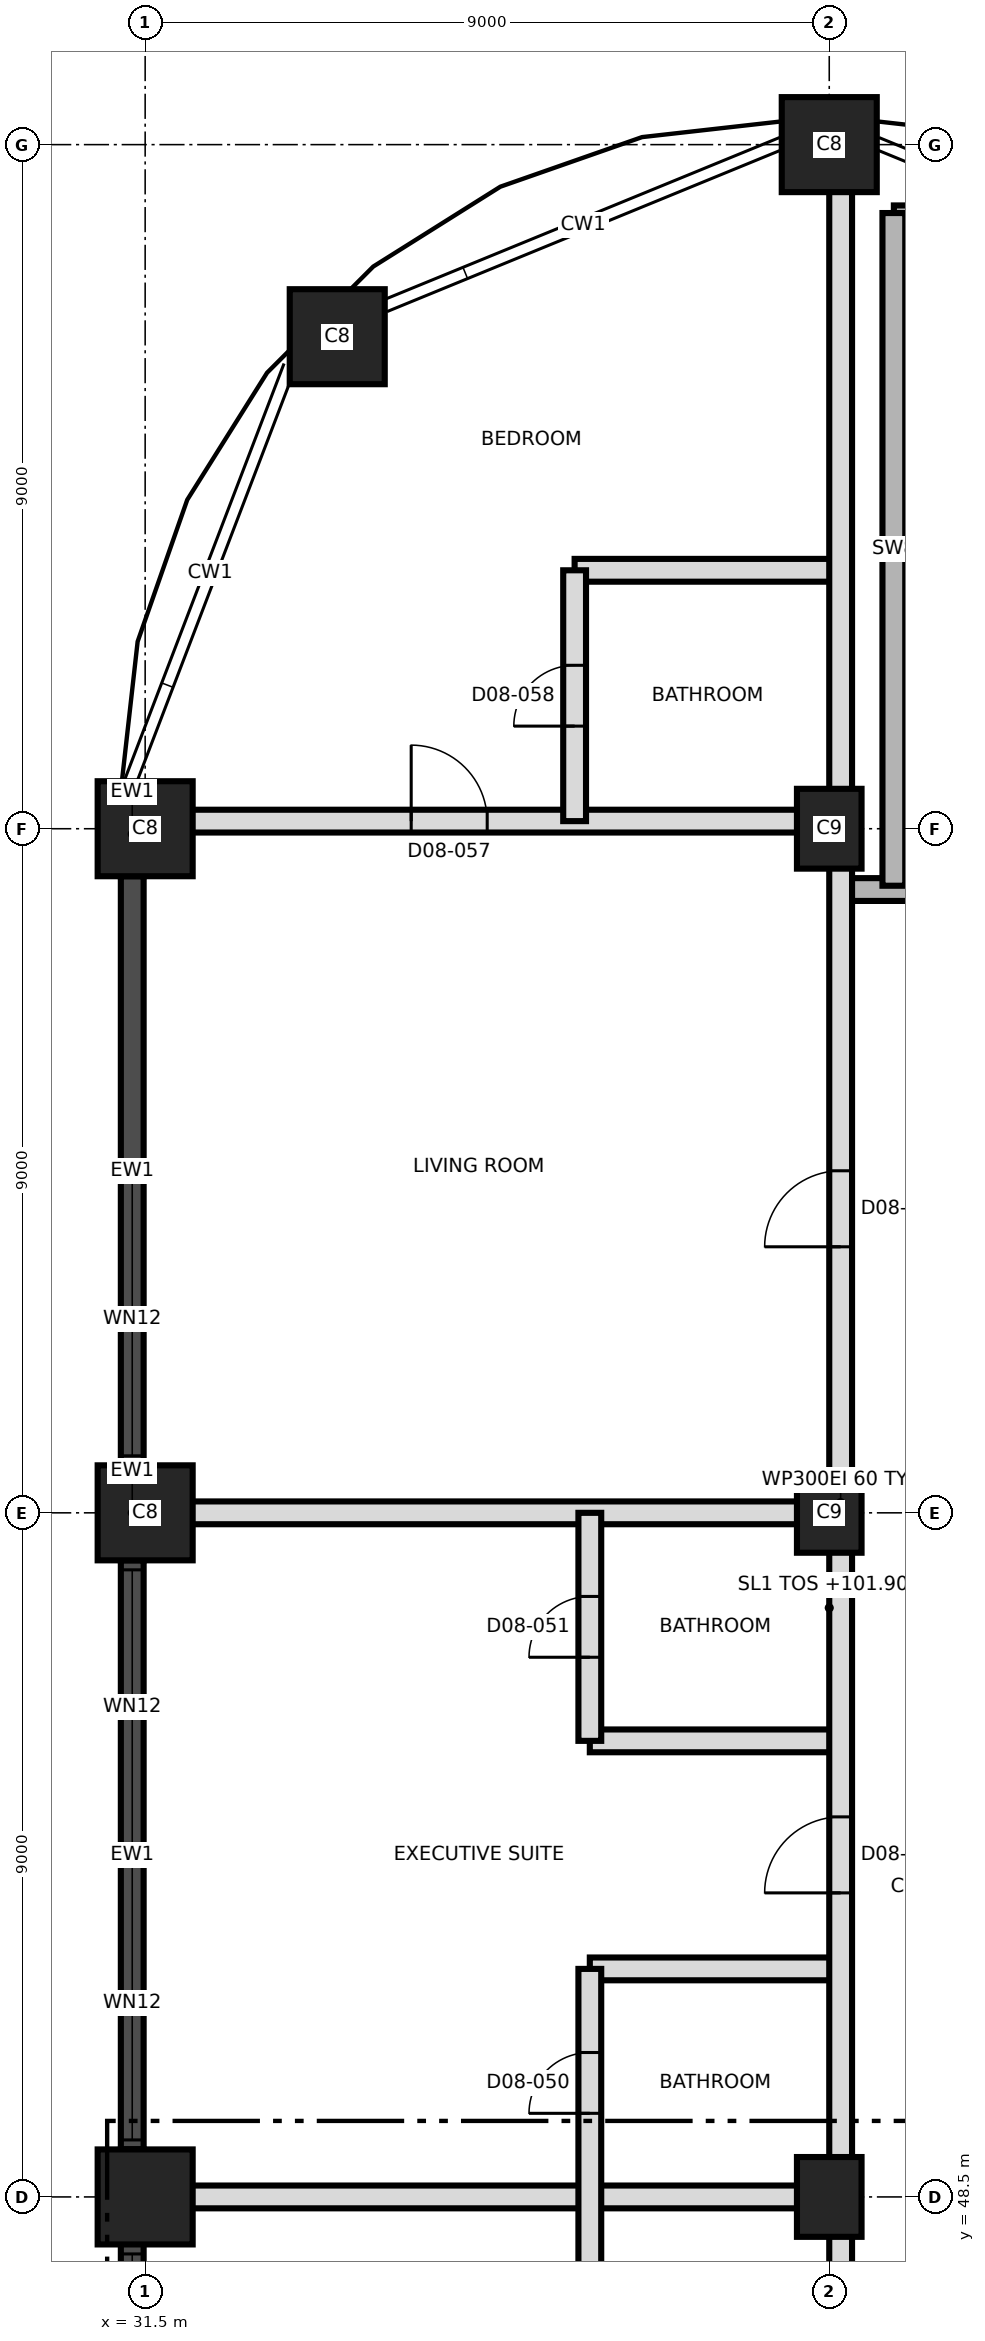
"""IFC4 building model, lengths in metres.
Left out: names, types, materials, properties, quantities, classifications, styles, units other than length and angle.
Written with IfcOpenShell. Run it as: python <this file> out.ifc"""

import sys

from ifc_helpers import new_model, si_unit, direction, frame, frame_2d, origin, origin_2d, place, context, subcontext, project, spatial, rectangle, extrude, element, fill, save


model = new_model("IFC4")
c1 = context("Model", 3, precision=1e-05, world=origin(), true_north=direction((0.0, 1.0)))
c2 = subcontext(c1, "Body", "Model", "MODEL_VIEW")
j1 = project(units=[si_unit("LENGTHUNIT", "METRE"), si_unit("PLANEANGLEUNIT", "RADIAN")], contexts=[c1])
p1 = place(None, origin())
s1 = spatial("IfcSite", under=j1, at=p1, CompositionType="ELEMENT")
p2 = place(p1, origin())
s2 = spatial("IfcBuilding", under=s1, at=p2, CompositionType="ELEMENT")
p3 = place(p2, frame((0.0, 0.0, 101.9)))
s3 = spatial("IfcBuildingStorey", under=s2, at=p3, CompositionType="ELEMENT", Elevation=101.9)
p4 = place(p3, frame((31.5, 48.5, 0.0), z_axis=(0.0, 0.0, 1.0), x_axis=(1.0, 0.0, 0.0)))
e1 = element("IfcColumn", 1, at=p4, inside=s3, PredefinedType="COLUMN", context=c2, shape_type="SweptSolid", body=[
    extrude(rectangle(XDim=1.25, YDim=1.25, at=origin_2d()), origin(), (0.0, 0.0, 1.0), 3.7),
])
p5 = place(p3, frame((40.5, 48.5, 0.0), z_axis=(0.0, 0.0, 1.0), x_axis=(0.0, 1.0, 0.0)))
e2 = element("IfcColumn", 2, at=p5, inside=s3, PredefinedType="COLUMN", context=c2, shape_type="SweptSolid", body=[
    extrude(rectangle(XDim=1.05, YDim=0.85, at=origin_2d()), origin(), (0.0, 0.0, 1.0), 3.7),
])
p6 = place(p3, frame((31.5, 57.5, 0.0), z_axis=(0.0, 0.0, 1.0), x_axis=(1.0, 0.0, 0.0)))
e3 = element("IfcColumn", 3, at=p6, inside=s3, PredefinedType="COLUMN", context=c2, shape_type="SweptSolid", body=[
    extrude(rectangle(XDim=1.25, YDim=1.25, at=origin_2d()), origin(), (0.0, 0.0, 1.0), 3.7),
])
p7 = place(p3, frame((40.5, 57.5, 0.0), z_axis=(0.0, 0.0, 1.0), x_axis=(0.0, 1.0, 0.0)))
e4 = element("IfcColumn", 4, at=p7, inside=s3, PredefinedType="COLUMN", context=c2, shape_type="SweptSolid", body=[
    extrude(rectangle(XDim=1.05, YDim=0.85, at=origin_2d()), origin(), (0.0, 0.0, 1.0), 3.7),
])
p8 = place(p3, frame((31.5, 66.5, 0.0), z_axis=(0.0, 0.0, 1.0), x_axis=(1.0, 0.0, 0.0)))
e5 = element("IfcColumn", 5, at=p8, inside=s3, PredefinedType="COLUMN", context=c2, shape_type="SweptSolid", body=[
    extrude(rectangle(XDim=1.25, YDim=1.25, at=origin_2d()), origin(), (0.0, 0.0, 1.0), 3.7),
])
p9 = place(p3, frame((40.5, 66.5, 0.0), z_axis=(0.0, 0.0, 1.0), x_axis=(0.0, 1.0, 0.0)))
e6 = element("IfcColumn", 6, at=p9, inside=s3, PredefinedType="COLUMN", context=c2, shape_type="SweptSolid", body=[
    extrude(rectangle(XDim=1.05, YDim=0.85, at=origin_2d()), origin(), (0.0, 0.0, 1.0), 3.7),
])
for number, where, z_axis, x_axis in (
    (7, (34.027, 72.973, 0.0), (0.0, 0.0, 1.0), (1.0, 0.0, 0.0)),
    (8, (40.5, 75.5, 0.0), (0.0, 0.0, 1.0), (1.0, 0.0, 0.0)),
):
    element("IfcColumn", number, at=place(p3, frame(where, z_axis=z_axis, x_axis=x_axis)), inside=s3, PredefinedType="COLUMN", context=c2, shape_type="SweptSolid", body=[
        extrude(rectangle(XDim=1.25, YDim=1.25, at=origin_2d()), origin(), (0.0, 0.0, 1.0), 3.7),
    ])
p10 = place(p3, frame((31.33, 66.986, 0.0), z_axis=(0.0, 0.0, 1.0), x_axis=(0.0, -1.0, 0.0)))
e9 = element("IfcWall", 9, at=p10, inside=s3, PredefinedType="SOLIDWALL", context=c2, shape_type="SweptSolid", body=[
    extrude(rectangle(XDim=1.111, YDim=0.3, at=frame_2d((0.556, 0.0))), origin(), (0.0, 0.0, 1.0), 3.4),
])
p11 = place(p3, frame((31.33, 65.875, 0.0), z_axis=(0.0, 0.0, 1.0), x_axis=(0.0, -1.0, 0.0)))
e10 = element("IfcWall", 10, at=p11, inside=s3, PredefinedType="SOLIDWALL", context=c2, shape_type="SweptSolid", body=[
    extrude(rectangle(XDim=7.75, YDim=0.3, at=frame_2d((3.875, 0.0))), origin(), (0.0, 0.0, 1.0), 2.75),
])
p12 = place(p11, frame((4.025, 0.0, 0.9)))
e11 = element("IfcOpeningElement", 11, at=p12, cuts=e10, PredefinedType="OPENING", context=c2, shape_type="SweptSolid", body=[
    extrude(rectangle(XDim=3.6, YDim=1.5, at=frame_2d((1.8, 0.75))), frame((0.0, 0.16, 0.0), z_axis=(0.0, -1.0, 0.0), x_axis=(1.0, 0.0, 0.0)), (0.0, 0.0, 1.0), 0.32),
])
p13 = place(p3, frame((31.33, 58.125, 0.0), z_axis=(0.0, 0.0, 1.0), x_axis=(0.0, -1.0, 0.0)))
e12 = element("IfcWall", 12, at=p13, inside=s3, PredefinedType="SOLIDWALL", context=c2, shape_type="SweptSolid", body=[
    extrude(rectangle(XDim=1.25, YDim=0.3, at=frame_2d((0.625, 0.0))), origin(), (0.0, 0.0, 1.0), 3.4),
])
p14 = place(p3, frame((31.33, 56.875, 0.0), z_axis=(0.0, 0.0, 1.0), x_axis=(0.0, -1.0, 0.0)))
e13 = element("IfcWall", 13, at=p14, inside=s3, PredefinedType="SOLIDWALL", context=c2, shape_type="SweptSolid", body=[
    extrude(rectangle(XDim=7.75, YDim=0.3, at=frame_2d((3.875, 0.0))), origin(), (0.0, 0.0, 1.0), 2.75),
])
p15 = place(p14, frame((0.125, 0.0, 0.9)))
e14 = element("IfcOpeningElement", 14, at=p15, cuts=e13, PredefinedType="OPENING", context=c2, shape_type="SweptSolid", body=[
    extrude(rectangle(XDim=3.6, YDim=1.5, at=frame_2d((1.8, 0.75))), frame((0.0, 0.16, 0.0), z_axis=(0.0, -1.0, 0.0), x_axis=(1.0, 0.0, 0.0)), (0.0, 0.0, 1.0), 0.32),
])
p16 = place(p14, frame((4.025, 0.0, 0.9)))
e15 = element("IfcOpeningElement", 15, at=p16, cuts=e13, PredefinedType="OPENING", context=c2, shape_type="SweptSolid", body=[
    extrude(rectangle(XDim=3.6, YDim=1.5, at=frame_2d((1.8, 0.75))), frame((0.0, 0.16, 0.0), z_axis=(0.0, -1.0, 0.0), x_axis=(1.0, 0.0, 0.0)), (0.0, 0.0, 1.0), 0.32),
])
p17 = place(p3, frame((31.33, 49.125, 0.0), z_axis=(0.0, 0.0, 1.0), x_axis=(0.0, -1.0, 0.0)))
e16 = element("IfcWall", 16, at=p17, inside=s3, PredefinedType="SOLIDWALL", context=c2, shape_type="SweptSolid", body=[
    extrude(rectangle(XDim=8.905, YDim=0.3, at=frame_2d((4.452, 0.0))), origin(), (0.0, 0.0, 1.0), 3.4),
])
p18 = place(p17, frame((1.375, 0.0, 0.9)))
e17 = element("IfcOpeningElement", 17, at=p18, cuts=e16, PredefinedType="OPENING", context=c2, shape_type="SweptSolid", body=[
    extrude(rectangle(XDim=3.6, YDim=1.5, at=frame_2d((1.8, 0.75))), frame((0.0, 0.16, 0.0), z_axis=(0.0, -1.0, 0.0), x_axis=(1.0, 0.0, 0.0)), (0.0, 0.0, 1.0), 0.32),
])
p19 = place(p17, frame((6.115, 0.0, 0.3)))
e18 = element("IfcOpeningElement", 18, at=p19, cuts=e16, PredefinedType="OPENING", context=c2, shape_type="SweptSolid", body=[
    extrude(rectangle(XDim=1.8, YDim=2.4, at=frame_2d((0.9, 1.2))), frame((0.0, 0.16, 0.0), z_axis=(0.0, -1.0, 0.0), x_axis=(1.0, 0.0, 0.0)), (0.0, 0.0, 1.0), 0.32),
])
p20 = place(p3, frame((31.53, 48.5, 0.0), z_axis=(0.0, 0.0, 1.0), x_axis=(1.0, 0.0, 0.0)))
e19 = element("IfcWall", 19, at=p20, inside=s3, PredefinedType="PARTITIONING", context=c2, shape_type="SweptSolid", body=[
    extrude(rectangle(XDim=9.12, YDim=0.3, at=frame_2d((4.56, 0.0))), origin(), (0.0, 0.0, 1.0), 3.4),
])
for number, where, z_axis, x_axis in (
    (20, (37.35, 51.5, 0.0), (0.0, 0.0, 1.0), (1.0, 0.0, 0.0)),
    (21, (37.35, 54.5, 0.0), (0.0, 0.0, 1.0), (1.0, 0.0, 0.0)),
):
    element("IfcWall", number, at=place(p3, frame(where, z_axis=z_axis, x_axis=x_axis)), inside=s3, PredefinedType="PARTITIONING", context=c2, shape_type="SweptSolid", body=[
        extrude(rectangle(XDim=3.3, YDim=0.3, at=frame_2d((1.65, 0.0))), origin(), (0.0, 0.0, 1.0), 3.4),
    ])
p21 = place(p3, frame((31.53, 57.5, 0.0), z_axis=(0.0, 0.0, 1.0), x_axis=(1.0, 0.0, 0.0)))
e22 = element("IfcWall", 22, at=p21, inside=s3, PredefinedType="PARTITIONING", context=c2, shape_type="SweptSolid", body=[
    extrude(rectangle(XDim=9.12, YDim=0.3, at=frame_2d((4.56, 0.0))), origin(), (0.0, 0.0, 1.0), 3.4),
])
p22 = place(p3, frame((40.65, 65.7, 0.0), z_axis=(0.0, 0.0, 1.0), x_axis=(1.0, 0.0, 0.0)))
e23 = element("IfcWall", 23, at=p22, inside=s3, PredefinedType="SHEAR", context=c2, shape_type="SweptSolid", body=[
    extrude(rectangle(XDim=6.2, YDim=0.3, at=frame_2d((3.1, 0.0))), origin(), (0.0, 0.0, 1.0), 3.4),
])
p23 = place(p22, frame((1.1, 0.0, 0.0)))
e24 = element("IfcOpeningElement", 24, at=p23, cuts=e23, PredefinedType="OPENING", context=c2, shape_type="SweptSolid", body=[
    extrude(rectangle(XDim=1.2, YDim=2.1, at=frame_2d((0.6, 1.05))), frame((0.0, 0.16, 0.0), z_axis=(0.0, -1.0, 0.0), x_axis=(1.0, 0.0, 0.0)), (0.0, 0.0, 1.0), 0.32),
])
p24 = place(p3, frame((31.53, 66.6, 0.0), z_axis=(0.0, 0.0, 1.0), x_axis=(1.0, 0.0, 0.0)))
e25 = element("IfcWall", 25, at=p24, inside=s3, PredefinedType="PARTITIONING", context=c2, shape_type="SweptSolid", body=[
    extrude(rectangle(XDim=9.12, YDim=0.3, at=frame_2d((4.56, 0.0))), origin(), (0.0, 0.0, 1.0), 3.4),
])
p25 = place(p24, frame((3.47, 0.0, 0.0)))
e26 = element("IfcOpeningElement", 26, at=p25, cuts=e25, PredefinedType="OPENING", context=c2, shape_type="SweptSolid", body=[
    extrude(rectangle(XDim=1.0, YDim=2.1, at=frame_2d((0.5, 1.05))), frame((0.0, 0.16, 0.0), z_axis=(0.0, -1.0, 0.0), x_axis=(1.0, 0.0, 0.0)), (0.0, 0.0, 1.0), 0.32),
])
p26 = place(p3, frame((37.15, 69.9, 0.0), z_axis=(0.0, 0.0, 1.0), x_axis=(1.0, 0.0, 0.0)))
e27 = element("IfcWall", 27, at=p26, inside=s3, PredefinedType="PARTITIONING", context=c2, shape_type="SweptSolid", body=[
    extrude(rectangle(XDim=3.5, YDim=0.3, at=frame_2d((1.75, 0.0))), origin(), (0.0, 0.0, 1.0), 3.4),
])
p27 = place(p3, frame((41.35, 74.55, 0.0), z_axis=(0.0, 0.0, 1.0), x_axis=(1.0, 0.0, 0.0)))
e28 = element("IfcWall", 28, at=p27, inside=s3, PredefinedType="SHEAR", context=c2, shape_type="SweptSolid", body=[
    extrude(rectangle(XDim=3.0, YDim=0.3, at=frame_2d((1.5, 0.0))), origin(), (0.0, 0.0, 1.0), 3.4),
])
p28 = place(p3, frame((37.15, 66.6, 0.0), z_axis=(0.0, 0.0, 1.0), x_axis=(0.0, 1.0, 0.0)))
e29 = element("IfcWall", 29, at=p28, inside=s3, PredefinedType="PARTITIONING", context=c2, shape_type="SweptSolid", body=[
    extrude(rectangle(XDim=3.3, YDim=0.3, at=frame_2d((1.65, 0.0))), origin(), (0.0, 0.0, 1.0), 3.4),
])
p29 = place(p28, frame((1.25, 0.0, 0.0)))
e30 = element("IfcOpeningElement", 30, at=p29, cuts=e29, PredefinedType="OPENING", context=c2, shape_type="SweptSolid", body=[
    extrude(rectangle(XDim=0.8, YDim=2.1, at=frame_2d((0.4, 1.05))), frame((0.0, 0.16, 0.0), z_axis=(0.0, -1.0, 0.0), x_axis=(1.0, 0.0, 0.0)), (0.0, 0.0, 1.0), 0.32),
])
p30 = place(p3, frame((37.35, 45.5, 0.0), z_axis=(0.0, 0.0, 1.0), x_axis=(0.0, 1.0, 0.0)))
e31 = element("IfcWall", 31, at=p30, inside=s3, PredefinedType="PARTITIONING", context=c2, shape_type="SweptSolid", body=[
    extrude(rectangle(XDim=6.0, YDim=0.3, at=frame_2d((3.0, 0.0))), origin(), (0.0, 0.0, 1.0), 3.4),
])
p31 = place(p30, frame((1.1, 0.0, 0.0)))
e32 = element("IfcOpeningElement", 32, at=p31, cuts=e31, PredefinedType="OPENING", context=c2, shape_type="SweptSolid", body=[
    extrude(rectangle(XDim=0.8, YDim=2.1, at=frame_2d((0.4, 1.05))), frame((0.0, 0.16, 0.0), z_axis=(0.0, -1.0, 0.0), x_axis=(1.0, 0.0, 0.0)), (0.0, 0.0, 1.0), 0.32),
])
p32 = place(p30, frame((4.1, 0.0, 0.0)))
e33 = element("IfcOpeningElement", 33, at=p32, cuts=e31, PredefinedType="OPENING", context=c2, shape_type="SweptSolid", body=[
    extrude(rectangle(XDim=0.8, YDim=2.1, at=frame_2d((0.4, 1.05))), frame((0.0, 0.16, 0.0), z_axis=(0.0, -1.0, 0.0), x_axis=(1.0, 0.0, 0.0)), (0.0, 0.0, 1.0), 0.32),
])
p33 = place(p3, frame((37.35, 54.5, 0.0), z_axis=(0.0, 0.0, 1.0), x_axis=(0.0, 1.0, 0.0)))
e34 = element("IfcWall", 34, at=p33, inside=s3, PredefinedType="PARTITIONING", context=c2, shape_type="SweptSolid", body=[
    extrude(rectangle(XDim=3.0, YDim=0.3, at=frame_2d((1.5, 0.0))), origin(), (0.0, 0.0, 1.0), 3.4),
])
p34 = place(p33, frame((1.1, 0.0, 0.0)))
e35 = element("IfcOpeningElement", 35, at=p34, cuts=e34, PredefinedType="OPENING", context=c2, shape_type="SweptSolid", body=[
    extrude(rectangle(XDim=0.8, YDim=2.1, at=frame_2d((0.4, 1.05))), frame((0.0, 0.16, 0.0), z_axis=(0.0, -1.0, 0.0), x_axis=(1.0, 0.0, 0.0)), (0.0, 0.0, 1.0), 0.32),
])
p35 = place(p3, frame((40.65, 39.8, 0.0), z_axis=(0.0, 0.0, 1.0), x_axis=(0.0, 1.0, 0.0)))
e36 = element("IfcWall", 36, at=p35, inside=s3, PredefinedType="PARTITIONING", context=c2, shape_type="SweptSolid", body=[
    extrude(rectangle(XDim=35.67, YDim=0.3, at=frame_2d((17.835, 0.0))), origin(), (0.0, 0.0, 1.0), 3.4),
])
p36 = place(p35, frame((3.7, 0.0, 0.0)))
e37 = element("IfcOpeningElement", 37, at=p36, cuts=e36, PredefinedType="OPENING", context=c2, shape_type="SweptSolid", body=[
    extrude(rectangle(XDim=1.0, YDim=2.4, at=frame_2d((0.5, 1.2))), frame((0.0, 0.16, 0.0), z_axis=(0.0, -1.0, 0.0), x_axis=(1.0, 0.0, 0.0)), (0.0, 0.0, 1.0), 0.32),
])
p37 = place(p35, frame((12.7, 0.0, 0.0)))
e38 = element("IfcOpeningElement", 38, at=p37, cuts=e36, PredefinedType="OPENING", context=c2, shape_type="SweptSolid", body=[
    extrude(rectangle(XDim=1.0, YDim=2.4, at=frame_2d((0.5, 1.2))), frame((0.0, 0.16, 0.0), z_axis=(0.0, -1.0, 0.0), x_axis=(1.0, 0.0, 0.0)), (0.0, 0.0, 1.0), 0.32),
])
p38 = place(p35, frame((21.2, 0.0, 0.0)))
e39 = element("IfcOpeningElement", 39, at=p38, cuts=e36, PredefinedType="OPENING", context=c2, shape_type="SweptSolid", body=[
    extrude(rectangle(XDim=1.0, YDim=2.4, at=frame_2d((0.5, 1.2))), frame((0.0, 0.16, 0.0), z_axis=(0.0, -1.0, 0.0), x_axis=(1.0, 0.0, 0.0)), (0.0, 0.0, 1.0), 0.32),
])
p39 = place(p3, frame((41.35, 65.75, 0.0), z_axis=(0.0, 0.0, 1.0), x_axis=(0.0, 1.0, 0.0)))
e40 = element("IfcWall", 40, at=p39, inside=s3, PredefinedType="SHEAR", context=c2, shape_type="SweptSolid", body=[
    extrude(rectangle(XDim=8.85, YDim=0.3, at=frame_2d((4.425, 0.0))), origin(), (0.0, 0.0, 1.0), 3.4),
])
p40 = place(p12, origin())
e41 = element("IfcWindow", 41, at=p40, inside=s3, PartitioningType="SINGLE_PANEL", PredefinedType="WINDOW", context=c2, shape_type="SweptSolid", body=[
    extrude(rectangle(XDim=3.6, YDim=1.5, at=frame_2d((1.8, 0.75))), frame((0.0, 0.03, 0.0), z_axis=(0.0, -1.0, 0.0), x_axis=(1.0, 0.0, 0.0)), (0.0, 0.0, 1.0), 0.06),
])
fill(e11, e41)
p41 = place(p15, origin())
e42 = element("IfcWindow", 42, at=p41, inside=s3, PartitioningType="SINGLE_PANEL", PredefinedType="WINDOW", context=c2, shape_type="SweptSolid", body=[
    extrude(rectangle(XDim=3.6, YDim=1.5, at=frame_2d((1.8, 0.75))), frame((0.0, 0.03, 0.0), z_axis=(0.0, -1.0, 0.0), x_axis=(1.0, 0.0, 0.0)), (0.0, 0.0, 1.0), 0.06),
])
fill(e14, e42)
p42 = place(p16, origin())
e43 = element("IfcWindow", 43, at=p42, inside=s3, PartitioningType="SINGLE_PANEL", PredefinedType="WINDOW", context=c2, shape_type="SweptSolid", body=[
    extrude(rectangle(XDim=3.6, YDim=1.5, at=frame_2d((1.8, 0.75))), frame((0.0, 0.03, 0.0), z_axis=(0.0, -1.0, 0.0), x_axis=(1.0, 0.0, 0.0)), (0.0, 0.0, 1.0), 0.06),
])
fill(e15, e43)
p43 = place(p18, origin())
e44 = element("IfcWindow", 44, at=p43, inside=s3, PartitioningType="SINGLE_PANEL", PredefinedType="WINDOW", context=c2, shape_type="SweptSolid", body=[
    extrude(rectangle(XDim=3.6, YDim=1.5, at=frame_2d((1.8, 0.75))), frame((0.0, 0.03, 0.0), z_axis=(0.0, -1.0, 0.0), x_axis=(1.0, 0.0, 0.0)), (0.0, 0.0, 1.0), 0.06),
])
fill(e17, e44)
p44 = place(p32, origin())
e45 = element("IfcDoor", 45, at=p44, inside=s3, OperationType="SINGLE_SWING_RIGHT", PredefinedType="DOOR", context=c2, shape_type="SweptSolid", body=[
    extrude(rectangle(XDim=0.8, YDim=2.1, at=frame_2d((0.4, 1.05))), frame((0.0, 0.025, 0.0), z_axis=(0.0, -1.0, 0.0), x_axis=(1.0, 0.0, 0.0)), (0.0, 0.0, 1.0), 0.05),
])
fill(e33, e45)
p45 = place(p34, origin())
e46 = element("IfcDoor", 46, at=p45, inside=s3, OperationType="SINGLE_SWING_LEFT", PredefinedType="DOOR", context=c2, shape_type="SweptSolid", body=[
    extrude(rectangle(XDim=0.8, YDim=2.1, at=frame_2d((0.4, 1.05))), frame((0.0, 0.025, 0.0), z_axis=(0.0, -1.0, 0.0), x_axis=(1.0, 0.0, 0.0)), (0.0, 0.0, 1.0), 0.05),
])
fill(e35, e46)
p46 = place(p37, origin())
e47 = element("IfcDoor", 47, at=p46, inside=s3, OperationType="SINGLE_SWING_LEFT", PredefinedType="DOOR", context=c2, shape_type="SweptSolid", body=[
    extrude(rectangle(XDim=1.0, YDim=2.4, at=frame_2d((0.5, 1.2))), frame((0.0, 0.025, 0.0), z_axis=(0.0, -1.0, 0.0), x_axis=(1.0, 0.0, 0.0)), (0.0, 0.0, 1.0), 0.05),
])
fill(e38, e47)
p47 = place(p38, origin())
e48 = element("IfcDoor", 48, at=p47, inside=s3, OperationType="SINGLE_SWING_LEFT", PredefinedType="DOOR", context=c2, shape_type="SweptSolid", body=[
    extrude(rectangle(XDim=1.0, YDim=2.4, at=frame_2d((0.5, 1.2))), frame((0.0, 0.025, 0.0), z_axis=(0.0, -1.0, 0.0), x_axis=(1.0, 0.0, 0.0)), (0.0, 0.0, 1.0), 0.05),
])
fill(e39, e48)
p48 = place(p25, origin())
e49 = element("IfcDoor", 49, at=p48, inside=s3, OperationType="SINGLE_SWING_RIGHT", PredefinedType="DOOR", context=c2, shape_type="SweptSolid", body=[
    extrude(rectangle(XDim=1.0, YDim=2.1, at=frame_2d((0.5, 1.05))), frame((0.0, 0.025, 0.0), z_axis=(0.0, -1.0, 0.0), x_axis=(1.0, 0.0, 0.0)), (0.0, 0.0, 1.0), 0.05),
])
fill(e26, e49)
p49 = place(p29, origin())
e50 = element("IfcDoor", 50, at=p49, inside=s3, OperationType="SINGLE_SWING_LEFT", PredefinedType="DOOR", context=c2, shape_type="SweptSolid", body=[
    extrude(rectangle(XDim=0.8, YDim=2.1, at=frame_2d((0.4, 1.05))), frame((0.0, 0.025, 0.0), z_axis=(0.0, -1.0, 0.0), x_axis=(1.0, 0.0, 0.0)), (0.0, 0.0, 1.0), 0.05),
])
fill(e30, e50)
save(model, sys.argv[1])
